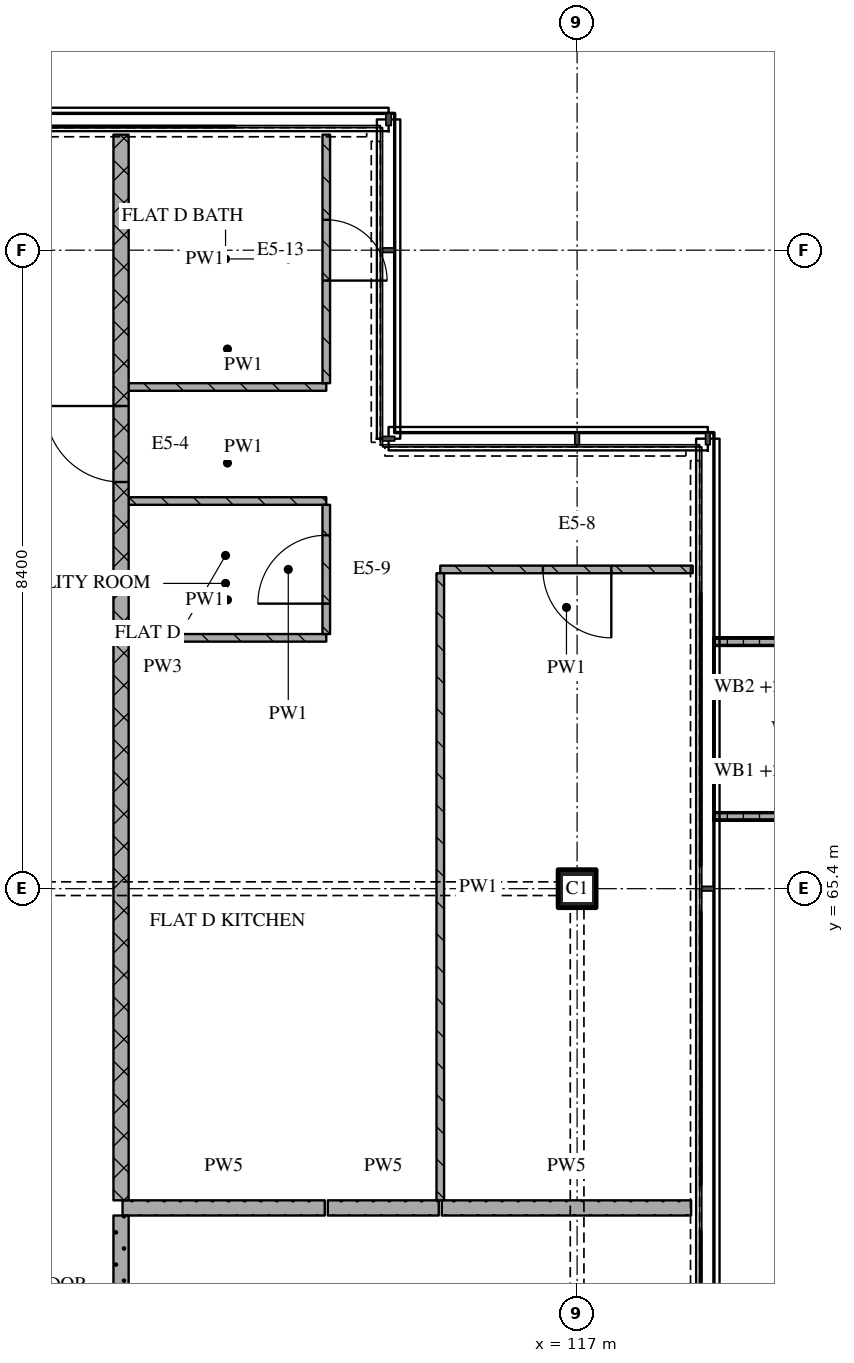
"""IFC4 building model, lengths in metres.
Left out: names, types, materials, properties, quantities, classifications, styles, units other than length and angle.
Written with IfcOpenShell. Run it as: python <this file> out.ifc"""

import sys

from ifc_helpers import new_model, si_unit, direction, frame, frame_2d, origin, origin_2d, place, context, subcontext, project, spatial, polyline, rectangle, outline, extrude, element, fill, save


model = new_model("IFC4")
c1 = context("Model", 3, precision=1e-05, world=origin(), true_north=direction((0.0, 1.0)))
c2 = subcontext(c1, "Body", "Model", "MODEL_VIEW")
j1 = project(units=[si_unit("LENGTHUNIT", "METRE"), si_unit("PLANEANGLEUNIT", "RADIAN")], contexts=[c1])
p1 = place(None, origin())
s1 = spatial("IfcSite", under=j1, at=p1, CompositionType="ELEMENT")
p2 = place(p1, origin())
s2 = spatial("IfcBuilding", under=s1, at=p2, CompositionType="ELEMENT")
p3 = place(p2, frame((0.0, 0.0, 288.75)))
s3 = spatial("IfcBuildingStorey", under=s2, at=p3, CompositionType="ELEMENT", Elevation=288.75)
p4 = place(p3, frame((117.0, 65.4, 0.0), z_axis=(0.0, 0.0, 1.0), x_axis=(1.0, 0.0, 0.0)))
e1 = element("IfcColumn", 1, at=p4, inside=s3, PredefinedType="COLUMN", context=c2, shape_type="SweptSolid", body=[
    extrude(rectangle(XDim=0.5, YDim=0.5, at=origin_2d()), origin(), (0.0, 0.0, 1.0), 3.6),
])
p5 = place(p3, origin())
e2 = element("IfcWall", 2, at=p5, inside=s3, PredefinedType="SOLIDWALL", context=c2, shape_type="SweptSolid", body=[
    extrude(outline(polyline([(118.8, 66.3), (118.8, 66.4), (120.3, 66.4), (120.3, 68.6), (118.8, 68.6), (118.8, 68.7), (120.4, 68.7), (120.4, 66.3), (118.8, 66.3)])), origin(), (0.0, 0.0, 1.0), 1.0),
])
p6 = place(p3, frame((111.02, 61.2, 0.0), z_axis=(0.0, 0.0, 1.0), x_axis=(1.0, 0.0, 0.0)))
e3 = element("IfcWall", 3, at=p6, inside=s3, PredefinedType="PARTITIONING", context=c2, shape_type="SweptSolid", body=[
    extrude(rectangle(XDim=2.66, YDim=0.2, at=frame_2d((1.33, 0.0))), origin(), (0.0, 0.0, 1.0), 3.32),
])
p7 = place(p3, frame((113.72, 61.2, 0.0), z_axis=(0.0, 0.0, 1.0), x_axis=(1.0, 0.0, 0.0)))
e4 = element("IfcWall", 4, at=p7, inside=s3, PredefinedType="PARTITIONING", context=c2, shape_type="SweptSolid", body=[
    extrude(rectangle(XDim=1.46, YDim=0.2, at=frame_2d((0.73, 0.0))), origin(), (0.0, 0.0, 1.0), 3.32),
])
p8 = place(p3, frame((115.22, 61.2, 0.0), z_axis=(0.0, 0.0, 1.0), x_axis=(1.0, 0.0, 0.0)))
e5 = element("IfcWall", 5, at=p8, inside=s3, PredefinedType="PARTITIONING", context=c2, shape_type="SweptSolid", body=[
    extrude(rectangle(XDim=3.28, YDim=0.2, at=frame_2d((1.64, 0.0))), origin(), (0.0, 0.0, 1.0), 3.32),
])
p9 = place(p3, frame((111.1, 68.7, 0.0), z_axis=(0.0, 0.0, 1.0), x_axis=(1.0, 0.0, 0.0)))
e6 = element("IfcWall", 6, at=p9, inside=s3, PredefinedType="PARTITIONING", context=c2, shape_type="SweptSolid", body=[
    extrude(rectangle(XDim=2.6, YDim=0.1, at=frame_2d((1.3, 0.0))), origin(), (0.0, 0.0, 1.0), 3.32),
])
p10 = place(p3, frame((118.52, 69.6, 0.0), z_axis=(0.0, 0.0, 1.0), x_axis=(-1.0, 0.0, 0.0)))
e7 = element("IfcWall", 7, at=p10, inside=s3, PredefinedType="PARTITIONING", context=c2, shape_type="SweptSolid", body=[
    extrude(rectangle(XDim=3.32, YDim=0.1, at=frame_2d((1.66, 0.0))), origin(), (0.0, 0.0, 1.0), 3.32),
])
p11 = place(p10, frame((1.07, 0.0, 0.0)))
e8 = element("IfcOpeningElement", 8, at=p11, cuts=e7, PredefinedType="OPENING", context=c2, shape_type="SweptSolid", body=[
    extrude(rectangle(XDim=0.9, YDim=2.1, at=frame_2d((0.45, 1.05))), frame((0.0, 0.06, 0.0), z_axis=(0.0, -1.0, 0.0), x_axis=(1.0, 0.0, 0.0)), (0.0, 0.0, 1.0), 0.12),
])
for number, where, z_axis, x_axis in (
    (9, (111.1, 70.5, 0.0), (0.0, 0.0, 1.0), (1.0, 0.0, 0.0)),
    (10, (111.1, 72.0, 0.0), (0.0, 0.0, 1.0), (1.0, 0.0, 0.0)),
):
    element("IfcWall", number, at=place(p3, frame(where, z_axis=z_axis, x_axis=x_axis)), inside=s3, PredefinedType="PARTITIONING", context=c2, shape_type="SweptSolid", body=[
        extrude(rectangle(XDim=2.6, YDim=0.1, at=frame_2d((1.3, 0.0))), origin(), (0.0, 0.0, 1.0), 3.32),
    ])
p12 = place(p3, frame((111.0, 75.32, 0.0), z_axis=(0.0, 0.0, 1.0), x_axis=(0.0, -1.0, 0.0)))
e11 = element("IfcWall", 11, at=p12, inside=s3, PredefinedType="PARTITIONING", context=c2, shape_type="SweptSolid", body=[
    extrude(rectangle(XDim=14.02, YDim=0.2, at=frame_2d((7.01, 0.0))), origin(), (0.0, 0.0, 1.0), 3.32),
])
p13 = place(p12, frame((3.57, 0.0, 0.0)))
e12 = element("IfcOpeningElement", 12, at=p13, cuts=e11, PredefinedType="OPENING", context=c2, shape_type="SweptSolid", body=[
    extrude(rectangle(XDim=1.0, YDim=2.1, at=frame_2d((0.5, 1.05))), frame((0.0, 0.11, 0.0), z_axis=(0.0, -1.0, 0.0), x_axis=(1.0, 0.0, 0.0)), (0.0, 0.0, 1.0), 0.22),
])
p14 = place(p3, frame((111.0, 61.1, 0.0), z_axis=(0.0, 0.0, 1.0), x_axis=(0.0, -1.0, 0.0)))
e13 = element("IfcWall", 13, at=p14, inside=s3, PredefinedType="PARTITIONING", context=c2, shape_type="SweptSolid", body=[
    extrude(rectangle(XDim=2.2, YDim=0.2, at=frame_2d((1.1, 0.0))), origin(), (0.0, 0.0, 1.0), 3.32),
])
p15 = place(p3, frame((113.7, 68.75, 0.0), z_axis=(0.0, 0.0, 1.0), x_axis=(0.0, 1.0, 0.0)))
e14 = element("IfcWall", 14, at=p15, inside=s3, PredefinedType="PARTITIONING", context=c2, shape_type="SweptSolid", body=[
    extrude(rectangle(XDim=1.7, YDim=0.1, at=frame_2d((0.85, 0.0))), origin(), (0.0, 0.0, 1.0), 3.32),
])
p16 = place(p15, frame((0.4, 0.0, 0.0)))
e15 = element("IfcOpeningElement", 15, at=p16, cuts=e14, PredefinedType="OPENING", context=c2, shape_type="SweptSolid", body=[
    extrude(rectangle(XDim=0.9, YDim=2.1, at=frame_2d((0.45, 1.05))), frame((0.0, 0.06, 0.0), z_axis=(0.0, -1.0, 0.0), x_axis=(1.0, 0.0, 0.0)), (0.0, 0.0, 1.0), 0.12),
])
p17 = place(p3, frame((113.7, 72.05, 0.0), z_axis=(0.0, 0.0, 1.0), x_axis=(0.0, 1.0, 0.0)))
e16 = element("IfcWall", 16, at=p17, inside=s3, PredefinedType="PARTITIONING", context=c2, shape_type="SweptSolid", body=[
    extrude(rectangle(XDim=3.27, YDim=0.1, at=frame_2d((1.635, 0.0))), origin(), (0.0, 0.0, 1.0), 3.32),
])
p18 = place(p17, frame((1.35, 0.0, 0.0)))
e17 = element("IfcOpeningElement", 17, at=p18, cuts=e16, PredefinedType="OPENING", context=c2, shape_type="SweptSolid", body=[
    extrude(rectangle(XDim=0.8, YDim=2.1, at=frame_2d((0.4, 1.05))), frame((0.0, 0.06, 0.0), z_axis=(0.0, -1.0, 0.0), x_axis=(1.0, 0.0, 0.0)), (0.0, 0.0, 1.0), 0.12),
])
p19 = place(p3, frame((115.2, 69.55, 0.0), z_axis=(0.0, 0.0, 1.0), x_axis=(0.0, -1.0, 0.0)))
e18 = element("IfcWall", 18, at=p19, inside=s3, PredefinedType="PARTITIONING", context=c2, shape_type="SweptSolid", body=[
    extrude(rectangle(XDim=8.25, YDim=0.1, at=frame_2d((4.125, 0.0))), origin(), (0.0, 0.0, 1.0), 3.32),
])
p20 = place(p11, origin())
e19 = element("IfcDoor", 19, at=p20, inside=s3, OperationType="SINGLE_SWING_LEFT", PredefinedType="DOOR", context=c2, shape_type="SweptSolid", body=[
    extrude(rectangle(XDim=0.9, YDim=2.1, at=frame_2d((0.45, 1.05))), frame((0.0, 0.025, 0.0), z_axis=(0.0, -1.0, 0.0), x_axis=(1.0, 0.0, 0.0)), (0.0, 0.0, 1.0), 0.05),
])
fill(e8, e19)
p21 = place(p13, origin())
e20 = element("IfcDoor", 20, at=p21, inside=s3, OperationType="SINGLE_SWING_RIGHT", PredefinedType="DOOR", context=c2, shape_type="SweptSolid", body=[
    extrude(rectangle(XDim=1.0, YDim=2.1, at=frame_2d((0.5, 1.05))), frame((0.0, 0.025, 0.0), z_axis=(0.0, -1.0, 0.0), x_axis=(1.0, 0.0, 0.0)), (0.0, 0.0, 1.0), 0.05),
])
fill(e12, e20)
p22 = place(p16, origin())
e21 = element("IfcDoor", 21, at=p22, inside=s3, OperationType="SINGLE_SWING_LEFT", PredefinedType="DOOR", context=c2, shape_type="SweptSolid", body=[
    extrude(rectangle(XDim=0.9, YDim=2.1, at=frame_2d((0.45, 1.05))), frame((0.0, 0.025, 0.0), z_axis=(0.0, -1.0, 0.0), x_axis=(1.0, 0.0, 0.0)), (0.0, 0.0, 1.0), 0.05),
])
fill(e15, e21)
p23 = place(p18, origin())
e22 = element("IfcDoor", 22, at=p23, inside=s3, OperationType="SINGLE_SWING_RIGHT", PredefinedType="DOOR", context=c2, shape_type="SweptSolid", body=[
    extrude(rectangle(XDim=0.8, YDim=2.1, at=frame_2d((0.4, 1.05))), frame((0.0, 0.025, 0.0), z_axis=(0.0, -1.0, 0.0), x_axis=(1.0, 0.0, 0.0)), (0.0, 0.0, 1.0), 0.05),
])
fill(e17, e22)
save(model, sys.argv[1])
